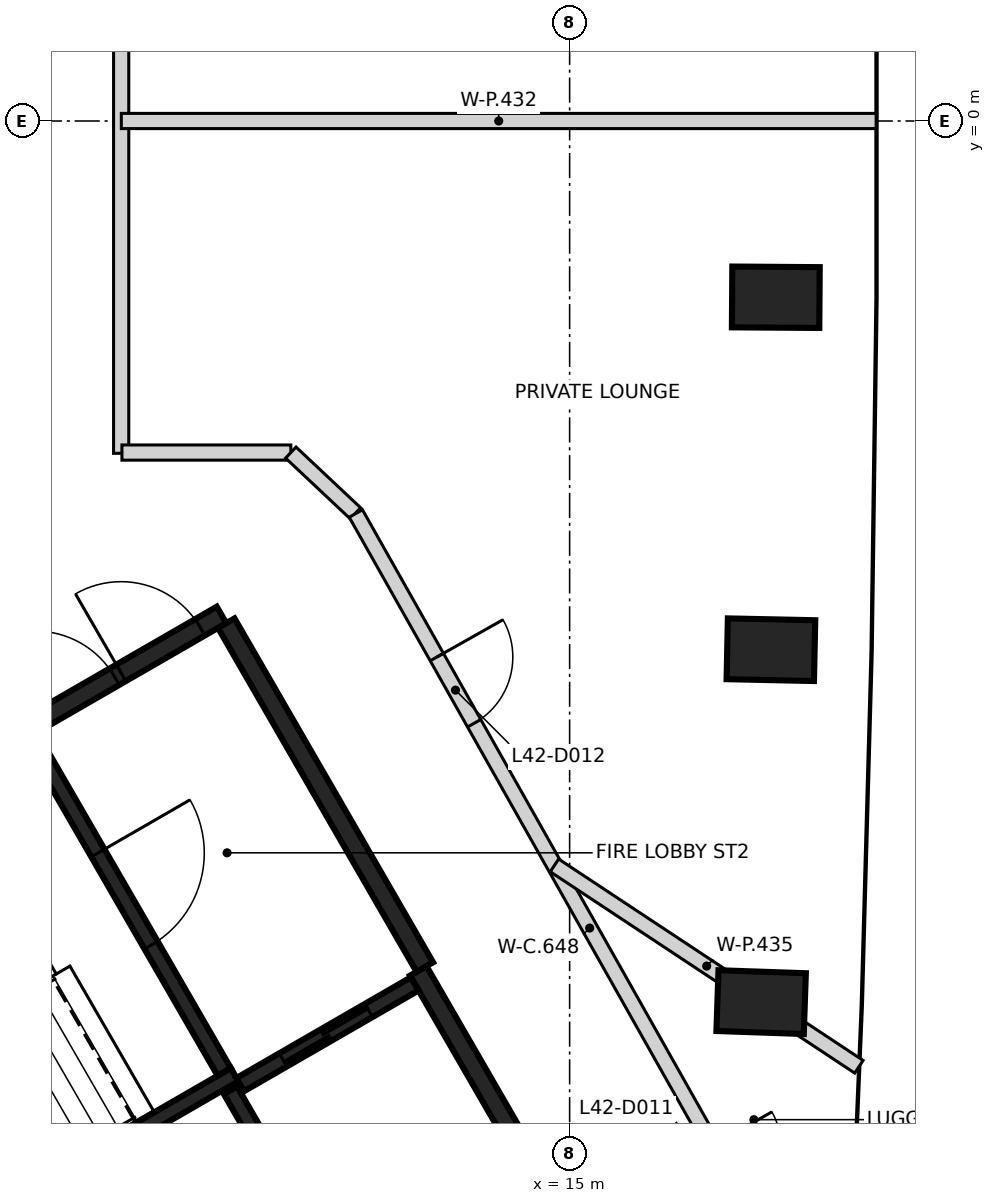
"""IFC4 building model, lengths in metres.
Left out: names, types, materials, properties, quantities, classifications, styles, units other than length and angle.
Written with IfcOpenShell. Run it as: python <this file> out.ifc"""

import sys

from ifc_helpers import new_model, si_unit, direction, frame, frame_2d, origin, origin_2d, place, context, subcontext, project, spatial, rectangle, extrude, element, fill, save


model = new_model("IFC4")
c1 = context("Model", 3, precision=1e-05, world=origin(), true_north=direction((0.0, 1.0)))
c2 = subcontext(c1, "Body", "Model", "MODEL_VIEW")
j1 = project(units=[si_unit("LENGTHUNIT", "METRE"), si_unit("PLANEANGLEUNIT", "RADIAN")], contexts=[c1])
p1 = place(None, origin())
s1 = spatial("IfcSite", under=j1, at=p1, CompositionType="ELEMENT")
p2 = place(p1, origin())
s2 = spatial("IfcBuilding", under=s1, at=p2, CompositionType="ELEMENT")
p3 = place(p2, frame((0.0, 0.0, 169.6)))
s3 = spatial("IfcBuildingStorey", under=s2, at=p3, CompositionType="ELEMENT", Elevation=169.6)
for number, where, z_axis, x_axis in (
    (1, (17.519, -11.592, -0.35), (0.0, 0.0, 1.0), (-0.999, 0.034, 0.0)),
    (2, (17.648, -6.956, -0.35), (0.0, 0.0, 1.0), (-1.0, 0.021, 0.0)),
    (3, (17.712, -2.319, -0.35), (0.0, 0.0, 1.0), (-1.0, 0.007, 0.0)),
):
    element("IfcColumn", number, at=place(p3, frame(where, z_axis=z_axis, x_axis=x_axis)), inside=s3, PredefinedType="COLUMN", context=c2, shape_type="SweptSolid", body=[
        extrude(rectangle(XDim=1.15, YDim=0.8, at=origin_2d()), origin(), (0.0, 0.0, 1.0), 6.0),
    ])
p4 = place(p3, frame((0.417, -12.273, 0.0), z_axis=(0.0, 0.0, 1.0), x_axis=(0.866021906294, 0.500006057782, 0.0)))
e4 = element("IfcWall", 4, at=p4, inside=s3, PredefinedType="SHEAR", context=c2, shape_type="SweptSolid", body=[
    extrude(rectangle(XDim=11.55, YDim=0.25, at=frame_2d((5.775, 0.0))), origin(), (0.0, 0.0, 1.0), 5.65),
])
p5 = place(p4, frame((10.025, 0.0, 0.0)))
e5 = element("IfcOpeningElement", 5, at=p5, cuts=e4, PredefinedType="OPENING", context=c2, shape_type="SweptSolid", body=[
    extrude(rectangle(XDim=1.2, YDim=2.1, at=frame_2d((0.6, 1.05))), frame((0.0, 0.135, 0.0), z_axis=(0.0, -1.0, 0.0), x_axis=(1.0, 0.0, 0.0)), (0.0, 0.0, 1.0), 0.27),
])
p6 = place(p4, frame((8.725, 0.0, 0.0)))
e6 = element("IfcOpeningElement", 6, at=p6, cuts=e4, PredefinedType="OPENING", context=c2, shape_type="SweptSolid", body=[
    extrude(rectangle(XDim=1.2, YDim=2.1, at=frame_2d((0.6, 1.05))), frame((0.0, 0.135, 0.0), z_axis=(0.0, -1.0, 0.0), x_axis=(1.0, 0.0, 0.0)), (0.0, 0.0, 1.0), 0.27),
])
p7 = place(p3, frame((13.008, -11.181, 0.0), z_axis=(0.0, 0.0, 1.0), x_axis=(0.500004234368, -0.866022959057, 0.0)))
e7 = element("IfcWall", 7, at=p7, inside=s3, PredefinedType="SHEAR", context=c2, shape_type="SweptSolid", body=[
    extrude(rectangle(XDim=6.25, YDim=0.25, at=frame_2d((3.125, 0.0))), origin(), (0.0, 0.0, 1.0), 5.65),
])
p8 = place(p3, frame((10.483, -6.606, 0.0), z_axis=(0.0, 0.0, 1.0), x_axis=(0.49999885962, -0.866026062182, 0.0)))
e8 = element("IfcWall", 8, at=p8, inside=s3, PredefinedType="SHEAR", context=c2, shape_type="SweptSolid", body=[
    extrude(rectangle(XDim=5.225, YDim=0.25, at=frame_2d((2.612, 0.0))), origin(), (0.0, 0.0, 1.0), 5.65),
])
p9 = place(p3, frame((5.526, -15.472, 0.0), z_axis=(0.0, 0.0, 1.0), x_axis=(0.866041752167, 0.499971682701, 0.0)))
e9 = element("IfcWall", 9, at=p9, inside=s3, PredefinedType="SHEAR", context=c2, shape_type="SweptSolid", body=[
    extrude(rectangle(XDim=5.851, YDim=0.2, at=frame_2d((2.925, 0.0))), origin(), (0.0, 0.0, 1.0), 5.65),
])
p10 = place(p3, frame((7.906, -8.094, 0.0), z_axis=(0.0, 0.0, 1.0), x_axis=(0.500027839223, -0.866009330205, 0.0)))
e10 = element("IfcWall", 10, at=p10, inside=s3, PredefinedType="SHEAR", context=c2, shape_type="SweptSolid", body=[
    extrude(rectangle(XDim=5.098, YDim=0.2, at=frame_2d((2.549, 0.0))), origin(), (0.0, 0.0, 1.0), 5.65),
])
p11 = place(p10, frame((1.774, 0.0, 0.0)))
e11 = element("IfcOpeningElement", 11, at=p11, cuts=e10, PredefinedType="OPENING", context=c2, shape_type="SweptSolid", body=[
    extrude(rectangle(XDim=1.4, YDim=2.1, at=frame_2d((0.7, 1.05))), frame((0.0, 0.11, 0.0), z_axis=(0.0, -1.0, 0.0), x_axis=(1.0, 0.0, 0.0)), (0.0, 0.0, 1.0), 0.22),
])
p12 = place(p3, frame((12.088, -15.437, 0.0), z_axis=(0.0, 0.0, 1.0), x_axis=(-0.500026960575, 0.86600983753, 0.0)))
e12 = element("IfcWall", 12, at=p12, inside=s3, PredefinedType="SHEAR", context=c2, shape_type="SweptSolid", body=[
    extrude(rectangle(XDim=3.1, YDim=0.2, at=frame_2d((1.55, 0.0))), origin(), (0.0, 0.0, 1.0), 5.65),
])
p13 = place(p3, frame((10.666, -12.678, 0.0), z_axis=(0.0, 0.0, 1.0), x_axis=(0.866018407898, 0.500012117035, 0.0)))
e13 = element("IfcWall", 13, at=p13, inside=s3, PredefinedType="SHEAR", context=c2, shape_type="SweptSolid", body=[
    extrude(rectangle(XDim=2.651, YDim=0.2, at=frame_2d((1.325, 0.0))), origin(), (0.0, 0.0, 1.0), 5.65),
])
p14 = place(p13, frame((0.652, 0.0, 0.0)))
e14 = element("IfcOpeningElement", 14, at=p14, cuts=e13, PredefinedType="OPENING", context=c2, shape_type="SweptSolid", body=[
    extrude(rectangle(XDim=1.3, YDim=2.1, at=frame_2d((0.65, 1.05))), frame((0.0, 0.11, 0.0), z_axis=(0.0, -1.0, 0.0), x_axis=(1.0, 0.0, 0.0)), (0.0, 0.0, 1.0), 0.22),
])
p15 = place(p3, frame((9.1, -4.372, 0.0), z_axis=(0.0, 0.0, 1.0), x_axis=(0.0, 1.0, 0.0)))
e15 = element("IfcWall", 15, at=p15, inside=s3, PredefinedType="PARTITIONING", context=c2, shape_type="SweptSolid", body=[
    extrude(rectangle(XDim=11.418, YDim=0.2, at=frame_2d((5.709, 0.0))), origin(), (0.0, 0.0, 1.0), 5.65),
])
p16 = place(p15, frame((7.424, 0.0, 0.0)))
e16 = element("IfcOpeningElement", 16, at=p16, cuts=e15, PredefinedType="OPENING", context=c2, shape_type="SweptSolid", body=[
    extrude(rectangle(XDim=1.0, YDim=2.1, at=frame_2d((0.5, 1.05))), frame((0.0, 0.11, 0.0), z_axis=(0.0, -1.0, 0.0), x_axis=(1.0, 0.0, 0.0)), (0.0, 0.0, 1.0), 0.22),
])
p17 = place(p3, frame((9.11, -4.362, 0.0), z_axis=(0.0, 0.0, 1.0), x_axis=(1.0, 0.0, 0.0)))
e17 = element("IfcWall", 17, at=p17, inside=s3, PredefinedType="PARTITIONING", context=c2, shape_type="SweptSolid", body=[
    extrude(rectangle(XDim=2.222, YDim=0.2, at=frame_2d((1.111, 0.0))), origin(), (0.0, 0.0, 1.0), 5.65),
])
p18 = place(p3, frame((11.332, -4.362, 0.0), z_axis=(0.0, 0.0, 1.0), x_axis=(0.728642293119, -0.684894450757, 0.0)))
e18 = element("IfcWall", 18, at=p18, inside=s3, PredefinedType="PARTITIONING", context=c2, shape_type="SweptSolid", body=[
    extrude(rectangle(XDim=1.166, YDim=0.2, at=frame_2d((0.583, 0.0))), origin(), (0.0, 0.0, 1.0), 5.65),
])
p19 = place(p3, frame((12.187, -5.164, 0.0), z_axis=(0.0, 0.0, 1.0), x_axis=(0.491323462206, -0.870977184251, 0.0)))
e19 = element("IfcWall", 19, at=p19, inside=s3, PredefinedType="PARTITIONING", context=c2, shape_type="SweptSolid", body=[
    extrude(rectangle(XDim=12.523, YDim=0.2, at=frame_2d((6.261, 0.0))), origin(), (0.0, 0.0, 1.0), 4.75),
])
p20 = place(p19, frame((9.546, 0.0, 0.0)))
e20 = element("IfcOpeningElement", 20, at=p20, cuts=e19, PredefinedType="OPENING", context=c2, shape_type="SweptSolid", body=[
    extrude(rectangle(XDim=0.9, YDim=2.1, at=frame_2d((0.45, 1.05))), frame((0.0, 0.11, 0.0), z_axis=(0.0, -1.0, 0.0), x_axis=(1.0, 0.0, 0.0)), (0.0, 0.0, 1.0), 0.22),
])
p21 = place(p19, frame((2.168, 0.0, 0.0)))
e21 = element("IfcOpeningElement", 21, at=p21, cuts=e19, PredefinedType="OPENING", context=c2, shape_type="SweptSolid", body=[
    extrude(rectangle(XDim=1.0, YDim=2.1, at=frame_2d((0.5, 1.05))), frame((0.0, 0.11, 0.0), z_axis=(0.0, -1.0, 0.0), x_axis=(1.0, 0.0, 0.0)), (0.0, 0.0, 1.0), 0.22),
])
p22 = place(p3, frame((9.102, 0.0, 0.0), z_axis=(0.0, 0.0, 1.0), x_axis=(1.0, 0.0, 0.0)))
e22 = element("IfcWall", 22, at=p22, inside=s3, PredefinedType="PARTITIONING", context=c2, shape_type="SweptSolid", body=[
    extrude(rectangle(XDim=9.93, YDim=0.2, at=frame_2d((4.965, 0.0))), origin(), (0.0, 0.0, 1.0), 4.75),
])
p23 = place(p3, frame((14.8, -9.793, 0.0), z_axis=(0.0, 0.0, 1.0), x_axis=(0.834078048978, -0.551646452189, 0.0)))
e23 = element("IfcWall", 23, at=p23, inside=s3, PredefinedType="PARTITIONING", context=c2, shape_type="SweptSolid", body=[
    extrude(rectangle(XDim=4.803, YDim=0.2, at=frame_2d((2.401, 0.0))), origin(), (0.0, 0.0, 1.0), 5.65),
])
p24 = place(p14, origin())
e24 = element("IfcDoor", 24, at=p24, inside=s3, OperationType="SLIDING_TO_RIGHT", PredefinedType="DOOR", context=c2, shape_type="SweptSolid", body=[
    extrude(rectangle(XDim=1.3, YDim=2.1, at=frame_2d((0.65, 1.05))), frame((0.0, 0.025, 0.0), z_axis=(0.0, -1.0, 0.0), x_axis=(1.0, 0.0, 0.0)), (0.0, 0.0, 1.0), 0.05),
])
fill(e14, e24)
p25 = place(p5, origin())
e25 = element("IfcDoor", 25, at=p25, inside=s3, OperationType="SINGLE_SWING_LEFT", PredefinedType="DOOR", context=c2, shape_type="SweptSolid", body=[
    extrude(rectangle(XDim=1.2, YDim=2.1, at=frame_2d((0.6, 1.05))), frame((0.0, 0.025, 0.0), z_axis=(0.0, -1.0, 0.0), x_axis=(1.0, 0.0, 0.0)), (0.0, 0.0, 1.0), 0.05),
])
fill(e5, e25)
p26 = place(p6, origin())
e26 = element("IfcDoor", 26, at=p26, inside=s3, OperationType="SINGLE_SWING_RIGHT", PredefinedType="DOOR", context=c2, shape_type="SweptSolid", body=[
    extrude(rectangle(XDim=1.2, YDim=2.1, at=frame_2d((0.6, 1.05))), frame((0.0, 0.025, 0.0), z_axis=(0.0, -1.0, 0.0), x_axis=(1.0, 0.0, 0.0)), (0.0, 0.0, 1.0), 0.05),
])
fill(e6, e26)
p27 = place(p11, origin())
e27 = element("IfcDoor", 27, at=p27, inside=s3, OperationType="SINGLE_SWING_RIGHT", PredefinedType="DOOR", context=c2, shape_type="SweptSolid", body=[
    extrude(rectangle(XDim=1.4, YDim=2.1, at=frame_2d((0.7, 1.05))), frame((0.0, 0.025, 0.0), z_axis=(0.0, -1.0, 0.0), x_axis=(1.0, 0.0, 0.0)), (0.0, 0.0, 1.0), 0.05),
])
fill(e11, e27)
p28 = place(p21, origin())
e28 = element("IfcDoor", 28, at=p28, inside=s3, OperationType="SINGLE_SWING_LEFT", PredefinedType="DOOR", context=c2, shape_type="SweptSolid", body=[
    extrude(rectangle(XDim=1.0, YDim=2.1, at=frame_2d((0.5, 1.05))), frame((0.0, 0.025, 0.0), z_axis=(0.0, -1.0, 0.0), x_axis=(1.0, 0.0, 0.0)), (0.0, 0.0, 1.0), 0.05),
])
fill(e21, e28)
save(model, sys.argv[1])
